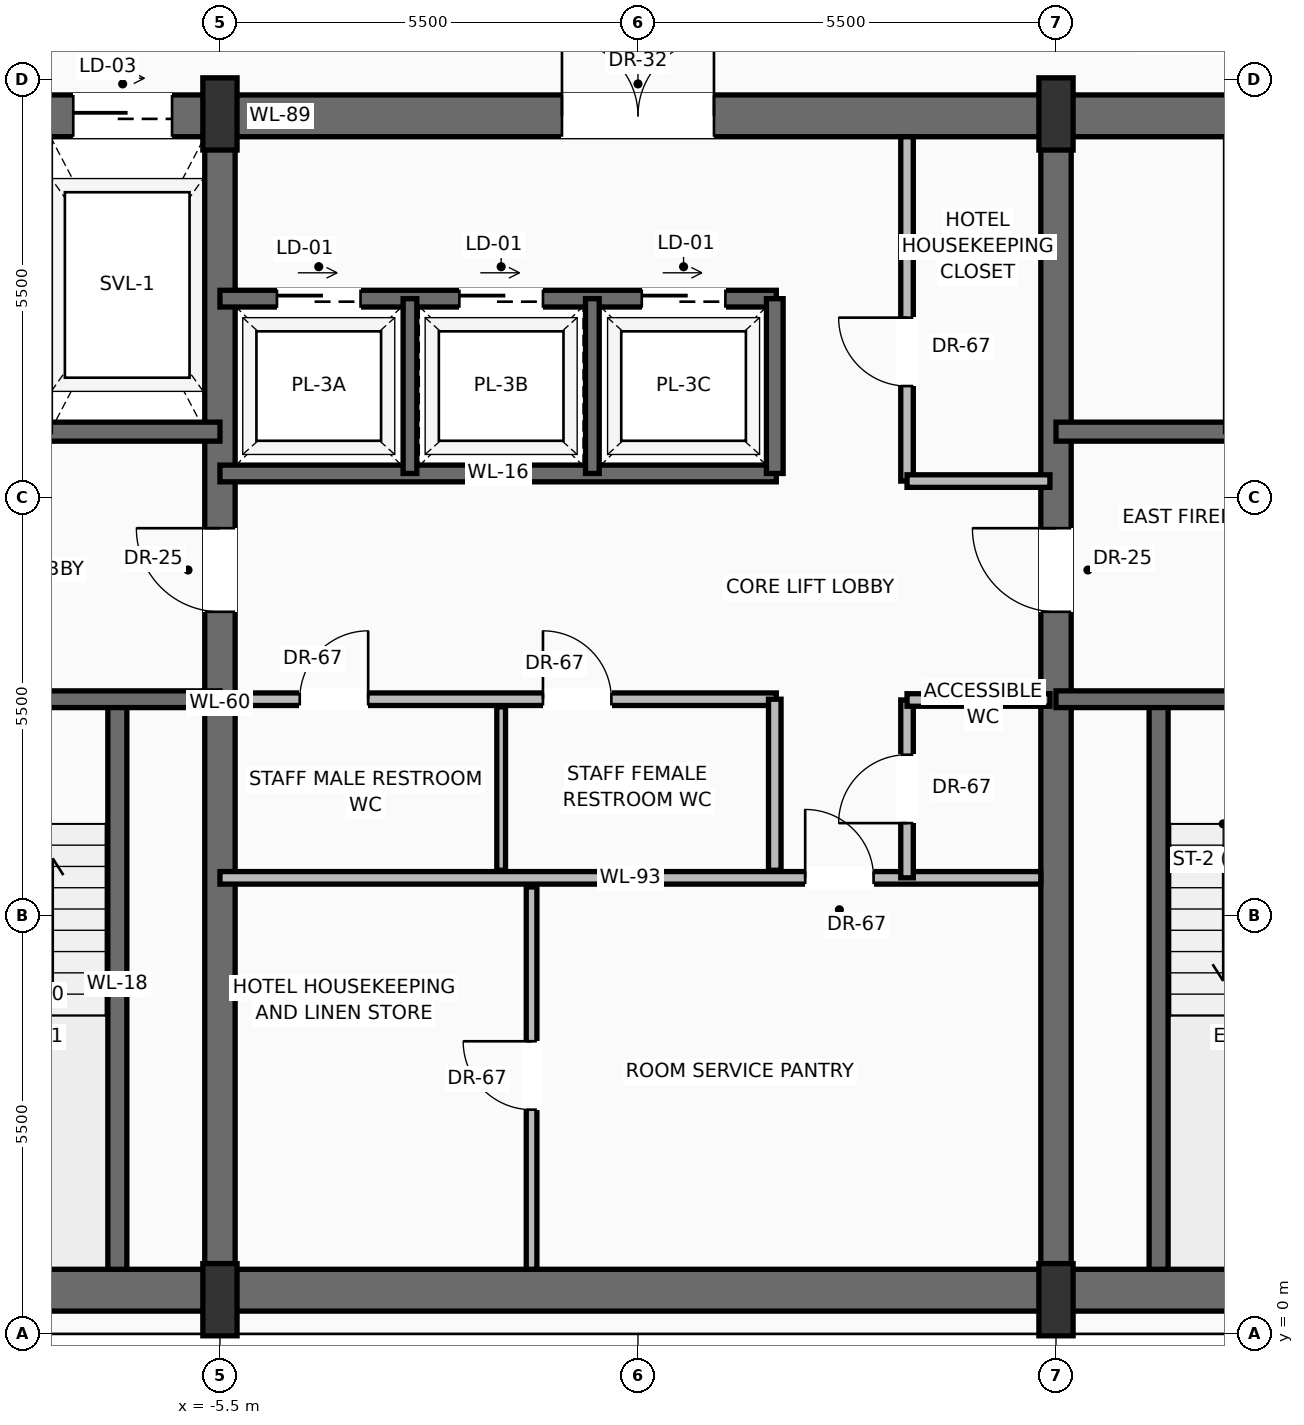
"""IFC4 building model, lengths in metres.
Left out: names, types, materials, properties, quantities, classifications, styles, units other than length and angle.
Written with IfcOpenShell. Run it as: python <this file> out.ifc"""

import sys

from ifc_helpers import new_model, si_unit, direction, frame, frame_2d, origin, origin_2d, place, context, subcontext, project, spatial, rectangle, extrude, source, transform, mapped, element, fill, save


model = new_model("IFC4")
c1 = context("Model", 3, precision=1e-05, world=origin(), true_north=direction((0.0, 1.0)))
c2 = subcontext(c1, "Body", "Model", "MODEL_VIEW")
j1 = project(units=[si_unit("LENGTHUNIT", "METRE"), si_unit("PLANEANGLEUNIT", "RADIAN")], contexts=[c1])
p1 = place(None, origin())
s1 = spatial("IfcSite", under=j1, at=p1, CompositionType="ELEMENT")
p2 = place(p1, origin())
s2 = spatial("IfcBuilding", under=s1, at=p2, CompositionType="ELEMENT")
p3 = place(p2, frame((0.0, 0.0, 254.5)))
s3 = spatial("IfcBuildingStorey", under=s2, at=p3, CompositionType="ELEMENT", Elevation=254.5)
p4 = place(p3, frame((-10.65, 0.575, 0.0), z_axis=(0.0, 0.0, 1.0), x_axis=(1.0, 0.0, 0.0)))
e1 = element("IfcWall", 1, at=p4, inside=s3, PredefinedType="SHEAR", context=c2, shape_type="SweptSolid", body=[
    extrude(rectangle(XDim=21.3, YDim=0.55, at=frame_2d((10.65, 0.0))), origin(), (0.0, 0.0, 1.0), 3.15),
])
p5 = place(p3, frame((-10.7, 16.025, 0.0), z_axis=(0.0, 0.0, 1.0), x_axis=(1.0, 0.0, 0.0)))
e2 = element("IfcWall", 2, at=p5, inside=s3, PredefinedType="SHEAR", context=c2, shape_type="SweptSolid", body=[
    extrude(rectangle(XDim=21.4, YDim=0.55, at=frame_2d((10.7, 0.0))), origin(), (0.0, 0.0, 1.0), 3.15),
])
p6 = place(p5, frame((3.27, 0.0, 0.0)))
e3 = element("IfcOpeningElement", 3, at=p6, cuts=e2, PredefinedType="OPENING", context=c2, shape_type="SweptSolid", body=[
    extrude(rectangle(XDim=1.3, YDim=2.3, at=frame_2d((0.65, 1.15))), frame((0.0, 0.285, 0.0), z_axis=(0.0, -1.0, 0.0), x_axis=(1.0, 0.0, 0.0)), (0.0, 0.0, 1.0), 0.57),
])
p7 = place(p5, frame((9.7, 0.0, 0.0)))
e4 = element("IfcOpeningElement", 4, at=p7, cuts=e2, PredefinedType="OPENING", context=c2, shape_type="SweptSolid", body=[
    extrude(rectangle(XDim=2.0, YDim=2.4, at=frame_2d((1.0, 1.2))), frame((0.0, 0.285, 0.0), z_axis=(0.0, -1.0, 0.0), x_axis=(1.0, 0.0, 0.0)), (0.0, 0.0, 1.0), 0.57),
])
p8 = place(p3, frame((-5.5, 0.575, 0.0), z_axis=(0.0, 0.0, 1.0), x_axis=(0.0, 1.0, 0.0)))
e5 = element("IfcWall", 5, at=p8, inside=s3, PredefinedType="SHEAR", context=c2, shape_type="SweptSolid", body=[
    extrude(rectangle(XDim=15.45, YDim=0.4, at=frame_2d((7.725, 0.0))), origin(), (0.0, 0.0, 1.0), 3.15),
])
p9 = place(p8, frame((8.925, 0.0, 0.0)))
e6 = element("IfcOpeningElement", 6, at=p9, cuts=e5, PredefinedType="OPENING", context=c2, shape_type="SweptSolid", body=[
    extrude(rectangle(XDim=1.1, YDim=2.2, at=frame_2d((0.55, 1.1))), frame((0.0, 0.21, 0.0), z_axis=(0.0, -1.0, 0.0), x_axis=(1.0, 0.0, 0.0)), (0.0, 0.0, 1.0), 0.42),
])
p10 = place(p3, frame((5.5, 0.575, 0.0), z_axis=(0.0, 0.0, 1.0), x_axis=(0.0, 1.0, 0.0)))
e7 = element("IfcWall", 7, at=p10, inside=s3, PredefinedType="SHEAR", context=c2, shape_type="SweptSolid", body=[
    extrude(rectangle(XDim=15.45, YDim=0.4, at=frame_2d((7.725, 0.0))), origin(), (0.0, 0.0, 1.0), 3.15),
])
p11 = place(p10, frame((8.925, 0.0, 0.0)))
e8 = element("IfcOpeningElement", 8, at=p11, cuts=e7, PredefinedType="OPENING", context=c2, shape_type="SweptSolid", body=[
    extrude(rectangle(XDim=1.1, YDim=2.2, at=frame_2d((0.55, 1.1))), frame((0.0, 0.21, 0.0), z_axis=(0.0, -1.0, 0.0), x_axis=(1.0, 0.0, 0.0)), (0.0, 0.0, 1.0), 0.42),
])
m1 = source(origin(), c2, "Body", "SweptSolid", [
    extrude(rectangle(XDim=0.45, YDim=0.95, at=origin_2d()), origin(), (0.0, 0.0, 1.0), 3.45),
])
for number, where, z_axis, x_axis in (
    (9, (-5.5, 0.45, 0.0), (0.0, 0.0, 1.0), (1.0, 0.0, 0.0)),
    (10, (5.5, 0.45, 0.0), (0.0, 0.0, 1.0), (1.0, 0.0, 0.0)),
    (11, (-5.5, 16.05, 0.0), (0.0, 0.0, 1.0), (1.0, 0.0, 0.0)),
    (12, (5.5, 16.05, 0.0), (0.0, 0.0, 1.0), (1.0, 0.0, 0.0)),
):
    element("IfcColumn", number, at=place(p3, frame(where, z_axis=z_axis, x_axis=x_axis)), inside=s3, PredefinedType="PILASTER", context=c2, shape_type="MappedRepresentation", body=[
        mapped(m1, transform((0.0, 0.0, 0.0), scale=1.0)),
    ])
p12 = place(p3, frame((-6.85, 0.85, 0.0), z_axis=(0.0, 0.0, 1.0), x_axis=(0.0, 1.0, 0.0)))
e13 = element("IfcWall", 13, at=p12, inside=s3, PredefinedType="SOLIDWALL", context=c2, shape_type="SweptSolid", body=[
    extrude(rectangle(XDim=7.5, YDim=0.25, at=frame_2d((3.75, 0.0))), origin(), (0.0, 0.0, 1.0), 3.15),
])
p13 = place(p3, frame((-5.5, 8.35, 0.0), z_axis=(0.0, 0.0, 1.0), x_axis=(-1.0, 0.0, 0.0)))
e14 = element("IfcWall", 14, at=p13, inside=s3, PredefinedType="SOLIDWALL", context=c2, shape_type="SweptSolid", body=[
    extrude(rectangle(XDim=4.65, YDim=0.22, at=frame_2d((2.325, 0.0))), origin(), (0.0, 0.0, 1.0), 3.15),
])
p14 = place(p13, frame((2.5, 0.0, 0.0)))
e15 = element("IfcOpeningElement", 15, at=p14, cuts=e14, PredefinedType="OPENING", context=c2, shape_type="SweptSolid", body=[
    extrude(rectangle(XDim=1.15, YDim=2.2, at=frame_2d((0.575, 1.1))), frame((0.0, 0.12, 0.0), z_axis=(0.0, -1.0, 0.0), x_axis=(1.0, 0.0, 0.0)), (0.0, 0.0, 1.0), 0.24),
])
p15 = place(p3, frame((-5.5, 11.87, 0.0), z_axis=(0.0, 0.0, 1.0), x_axis=(-1.0, 0.0, 0.0)))
e16 = element("IfcWall", 16, at=p15, inside=s3, PredefinedType="SOLIDWALL", context=c2, shape_type="SweptSolid", body=[
    extrude(rectangle(XDim=4.65, YDim=0.25, at=frame_2d((2.325, 0.0))), origin(), (0.0, 0.0, 1.0), 3.15),
])
p16 = place(p15, frame((2.95, 0.0, 0.0)))
e17 = element("IfcOpeningElement", 17, at=p16, cuts=e16, PredefinedType="OPENING", context=c2, shape_type="SweptSolid", body=[
    extrude(rectangle(XDim=1.2, YDim=2.25, at=frame_2d((0.6, 1.125))), frame((0.0, 0.135, 0.0), z_axis=(0.0, -1.0, 0.0), x_axis=(1.0, 0.0, 0.0)), (0.0, 0.0, 1.0), 0.27),
])
p17 = place(p3, frame((6.85, 0.85, 0.0), z_axis=(0.0, 0.0, 1.0), x_axis=(0.0, 1.0, 0.0)))
e18 = element("IfcWall", 18, at=p17, inside=s3, PredefinedType="SOLIDWALL", context=c2, shape_type="SweptSolid", body=[
    extrude(rectangle(XDim=7.5, YDim=0.25, at=frame_2d((3.75, 0.0))), origin(), (0.0, 0.0, 1.0), 3.15),
])
p18 = place(p3, frame((10.15, 8.35, 0.0), z_axis=(0.0, 0.0, 1.0), x_axis=(-1.0, 0.0, 0.0)))
e19 = element("IfcWall", 19, at=p18, inside=s3, PredefinedType="SOLIDWALL", context=c2, shape_type="SweptSolid", body=[
    extrude(rectangle(XDim=4.65, YDim=0.22, at=frame_2d((2.325, 0.0))), origin(), (0.0, 0.0, 1.0), 3.15),
])
p19 = place(p18, frame((1.0, 0.0, 0.0)))
e20 = element("IfcOpeningElement", 20, at=p19, cuts=e19, PredefinedType="OPENING", context=c2, shape_type="SweptSolid", body=[
    extrude(rectangle(XDim=1.15, YDim=2.2, at=frame_2d((0.575, 1.1))), frame((0.0, 0.12, 0.0), z_axis=(0.0, -1.0, 0.0), x_axis=(1.0, 0.0, 0.0)), (0.0, 0.0, 1.0), 0.24),
])
p20 = place(p3, frame((10.15, 11.87, 0.0), z_axis=(0.0, 0.0, 1.0), x_axis=(-1.0, 0.0, 0.0)))
e21 = element("IfcWall", 21, at=p20, inside=s3, PredefinedType="SOLIDWALL", context=c2, shape_type="SweptSolid", body=[
    extrude(rectangle(XDim=4.65, YDim=0.25, at=frame_2d((2.325, 0.0))), origin(), (0.0, 0.0, 1.0), 3.15),
])
p21 = place(p20, frame((0.5, 0.0, 0.0)))
e22 = element("IfcOpeningElement", 22, at=p21, cuts=e21, PredefinedType="OPENING", context=c2, shape_type="SweptSolid", body=[
    extrude(rectangle(XDim=1.2, YDim=2.25, at=frame_2d((0.6, 1.125))), frame((0.0, 0.135, 0.0), z_axis=(0.0, -1.0, 0.0), x_axis=(1.0, 0.0, 0.0)), (0.0, 0.0, 1.0), 0.27),
])
p22 = place(p3, frame((-5.5, 6.0, 0.0), z_axis=(0.0, 0.0, 1.0), x_axis=(1.0, 0.0, 0.0)))
e23 = element("IfcWall", 23, at=p22, inside=s3, PredefinedType="PARTITIONING", context=c2, shape_type="SweptSolid", body=[
    extrude(rectangle(XDim=10.8, YDim=0.165, at=frame_2d((5.4, 0.0))), origin(), (0.0, 0.0, 1.0), 3.142),
])
p23 = place(p22, frame((7.7, 0.0, 0.0)))
e24 = element("IfcOpeningElement", 24, at=p23, cuts=e23, PredefinedType="OPENING", context=c2, shape_type="SweptSolid", body=[
    extrude(rectangle(XDim=0.9, YDim=2.1, at=frame_2d((0.45, 1.05))), frame((0.0, 0.093, 0.0), z_axis=(0.0, -1.0, 0.0), x_axis=(1.0, 0.0, 0.0)), (0.0, 0.0, 1.0), 0.185),
])
p24 = place(p3, frame((-1.4, 0.85, 0.0), z_axis=(0.0, 0.0, 1.0), x_axis=(0.0, 1.0, 0.0)))
e25 = element("IfcWall", 25, at=p24, inside=s3, PredefinedType="PARTITIONING", context=c2, shape_type="SweptSolid", body=[
    extrude(rectangle(XDim=5.03, YDim=0.14, at=frame_2d((2.515, 0.0))), origin(), (0.0, 0.0, 1.0), 3.142),
])
p25 = place(p24, frame((2.1, 0.0, 0.0)))
e26 = element("IfcOpeningElement", 26, at=p25, cuts=e25, PredefinedType="OPENING", context=c2, shape_type="SweptSolid", body=[
    extrude(rectangle(XDim=0.9, YDim=2.1, at=frame_2d((0.45, 1.05))), frame((0.0, 0.08, 0.0), z_axis=(0.0, -1.0, 0.0), x_axis=(1.0, 0.0, 0.0)), (0.0, 0.0, 1.0), 0.16),
])
p26 = place(p3, frame((3.54, 6.0, 0.0), z_axis=(0.0, 0.0, 1.0), x_axis=(0.0, 1.0, 0.0)))
e27 = element("IfcWall", 27, at=p26, inside=s3, PredefinedType="PARTITIONING", context=c2, shape_type="SweptSolid", body=[
    extrude(rectangle(XDim=2.34, YDim=0.165, at=frame_2d((1.17, 0.0))), origin(), (0.0, 0.0, 1.0), 3.142),
])
p27 = place(p26, frame((0.72, 0.0, 0.0)))
e28 = element("IfcOpeningElement", 28, at=p27, cuts=e27, PredefinedType="OPENING", context=c2, shape_type="SweptSolid", body=[
    extrude(rectangle(XDim=0.9, YDim=2.1, at=frame_2d((0.45, 1.05))), frame((0.0, 0.093, 0.0), z_axis=(0.0, -1.0, 0.0), x_axis=(1.0, 0.0, 0.0)), (0.0, 0.0, 1.0), 0.185),
])
p28 = place(p3, frame((3.54, 8.34, 0.0), z_axis=(0.0, 0.0, 1.0), x_axis=(1.0, 0.0, 0.0)))
e29 = element("IfcWall", 29, at=p28, inside=s3, PredefinedType="PARTITIONING", context=c2, shape_type="SweptSolid", body=[
    extrude(rectangle(XDim=1.88, YDim=0.165, at=frame_2d((0.94, 0.0))), origin(), (0.0, 0.0, 1.0), 3.142),
])
p29 = place(p3, frame((-5.3, 8.35, 0.0), z_axis=(0.0, 0.0, 1.0), x_axis=(1.0, 0.0, 0.0)))
e30 = element("IfcWall", 30, at=p29, inside=s3, PredefinedType="PARTITIONING", context=c2, shape_type="SweptSolid", body=[
    extrude(rectangle(XDim=7.12, YDim=0.165, at=frame_2d((3.56, 0.0))), origin(), (0.0, 0.0, 1.0), 3.142),
])
p30 = place(p29, frame((0.85, 0.0, 0.0)))
e31 = element("IfcOpeningElement", 31, at=p30, cuts=e30, PredefinedType="OPENING", context=c2, shape_type="SweptSolid", body=[
    extrude(rectangle(XDim=0.9, YDim=2.1, at=frame_2d((0.45, 1.05))), frame((0.0, 0.093, 0.0), z_axis=(0.0, -1.0, 0.0), x_axis=(1.0, 0.0, 0.0)), (0.0, 0.0, 1.0), 0.185),
])
p31 = place(p29, frame((4.05, 0.0, 0.0)))
e32 = element("IfcOpeningElement", 32, at=p31, cuts=e30, PredefinedType="OPENING", context=c2, shape_type="SweptSolid", body=[
    extrude(rectangle(XDim=0.9, YDim=2.1, at=frame_2d((0.45, 1.05))), frame((0.0, 0.093, 0.0), z_axis=(0.0, -1.0, 0.0), x_axis=(1.0, 0.0, 0.0)), (0.0, 0.0, 1.0), 0.185),
])
p32 = place(p3, frame((1.8, 6.1, 0.0), z_axis=(0.0, 0.0, 1.0), x_axis=(0.0, 1.0, 0.0)))
e33 = element("IfcWall", 33, at=p32, inside=s3, PredefinedType="PARTITIONING", context=c2, shape_type="SweptSolid", body=[
    extrude(rectangle(XDim=2.25, YDim=0.165, at=frame_2d((1.125, 0.0))), origin(), (0.0, 0.0, 1.0), 3.142),
])
p33 = place(p3, frame((-1.8, 6.1, 0.0), z_axis=(0.0, 0.0, 1.0), x_axis=(0.0, 1.0, 0.0)))
e34 = element("IfcWall", 34, at=p33, inside=s3, PredefinedType="PARTITIONING", context=c2, shape_type="SweptSolid", body=[
    extrude(rectangle(XDim=2.15, YDim=0.115, at=frame_2d((1.075, 0.0))), origin(), (0.0, 0.0, 1.0), 3.142),
])
p34 = place(p3, frame((-5.5, 11.32, 0.0), z_axis=(0.0, 0.0, 1.0), x_axis=(1.0, 0.0, 0.0)))
e35 = element("IfcWall", 35, at=p34, inside=s3, PredefinedType="SOLIDWALL", context=c2, shape_type="SweptSolid", body=[
    extrude(rectangle(XDim=7.32, YDim=0.22, at=frame_2d((3.66, 0.0))), origin(), (0.0, 0.0, 1.0), 3.15),
])
p35 = place(p3, frame((-5.5, 13.62, 0.0), z_axis=(0.0, 0.0, 1.0), x_axis=(1.0, 0.0, 0.0)))
e36 = element("IfcWall", 36, at=p35, inside=s3, PredefinedType="SOLIDWALL", context=c2, shape_type="SweptSolid", body=[
    extrude(rectangle(XDim=7.32, YDim=0.22, at=frame_2d((3.66, 0.0))), origin(), (0.0, 0.0, 1.0), 3.15),
])
p36 = place(p35, frame((0.75, 0.0, 0.0)))
e37 = element("IfcOpeningElement", 37, at=p36, cuts=e36, PredefinedType="OPENING", context=c2, shape_type="SweptSolid", body=[
    extrude(rectangle(XDim=1.1, YDim=2.2, at=frame_2d((0.55, 1.1))), frame((0.0, 0.12, 0.0), z_axis=(0.0, -1.0, 0.0), x_axis=(1.0, 0.0, 0.0)), (0.0, 0.0, 1.0), 0.24),
])
p37 = place(p35, frame((3.15, 0.0, 0.0)))
e38 = element("IfcOpeningElement", 38, at=p37, cuts=e36, PredefinedType="OPENING", context=c2, shape_type="SweptSolid", body=[
    extrude(rectangle(XDim=1.1, YDim=2.2, at=frame_2d((0.55, 1.1))), frame((0.0, 0.12, 0.0), z_axis=(0.0, -1.0, 0.0), x_axis=(1.0, 0.0, 0.0)), (0.0, 0.0, 1.0), 0.24),
])
p38 = place(p35, frame((5.55, 0.0, 0.0)))
e39 = element("IfcOpeningElement", 39, at=p38, cuts=e36, PredefinedType="OPENING", context=c2, shape_type="SweptSolid", body=[
    extrude(rectangle(XDim=1.1, YDim=2.2, at=frame_2d((0.55, 1.1))), frame((0.0, 0.12, 0.0), z_axis=(0.0, -1.0, 0.0), x_axis=(1.0, 0.0, 0.0)), (0.0, 0.0, 1.0), 0.24),
])
p39 = place(p3, frame((1.8, 11.32, 0.0), z_axis=(0.0, 0.0, 1.0), x_axis=(0.0, 1.0, 0.0)))
e40 = element("IfcWall", 40, at=p39, inside=s3, PredefinedType="SOLIDWALL", context=c2, shape_type="SweptSolid", body=[
    extrude(rectangle(XDim=2.3, YDim=0.22, at=frame_2d((1.15, 0.0))), origin(), (0.0, 0.0, 1.0), 3.15),
])
for number, where, z_axis, x_axis in (
    (41, (-3.0, 11.32, 0.0), (0.0, 0.0, 1.0), (0.0, 1.0, 0.0)),
    (42, (-0.6, 11.32, 0.0), (0.0, 0.0, 1.0), (0.0, 1.0, 0.0)),
):
    element("IfcWall", number, at=place(p3, frame(where, z_axis=z_axis, x_axis=x_axis)), inside=s3, PredefinedType="SOLIDWALL", context=c2, shape_type="SweptSolid", body=[
        extrude(rectangle(XDim=2.3, YDim=0.18, at=frame_2d((1.15, 0.0))), origin(), (0.0, 0.0, 1.0), 3.15),
    ])
p40 = place(p3, frame((3.54, 11.22, 0.0), z_axis=(0.0, 0.0, 1.0), x_axis=(0.0, 1.0, 0.0)))
e43 = element("IfcWall", 43, at=p40, inside=s3, PredefinedType="PARTITIONING", context=c2, shape_type="SweptSolid", body=[
    extrude(rectangle(XDim=4.53, YDim=0.165, at=frame_2d((2.265, 0.0))), origin(), (0.0, 0.0, 1.0), 3.142),
])
p41 = place(p40, frame((1.25, 0.0, 0.0)))
e44 = element("IfcOpeningElement", 44, at=p41, cuts=e43, PredefinedType="OPENING", context=c2, shape_type="SweptSolid", body=[
    extrude(rectangle(XDim=0.9, YDim=2.1, at=frame_2d((0.45, 1.05))), frame((0.0, 0.093, 0.0), z_axis=(0.0, -1.0, 0.0), x_axis=(1.0, 0.0, 0.0)), (0.0, 0.0, 1.0), 0.185),
])
p42 = place(p3, frame((3.54, 11.22, 0.0), z_axis=(0.0, 0.0, 1.0), x_axis=(1.0, 0.0, 0.0)))
e45 = element("IfcWall", 45, at=p42, inside=s3, PredefinedType="PARTITIONING", context=c2, shape_type="SweptSolid", body=[
    extrude(rectangle(XDim=1.88, YDim=0.165, at=frame_2d((0.94, 0.0))), origin(), (0.0, 0.0, 1.0), 3.142),
])
m2 = source(origin(), c2, "Body", "SweptSolid", [
    extrude(rectangle(XDim=1.1, YDim=2.2, at=frame_2d((0.55, 1.1))), frame((0.0, 0.025, 0.0), z_axis=(0.0, -1.0, 0.0), x_axis=(1.0, 0.0, 0.0)), (0.0, 0.0, 1.0), 0.05),
])
p43 = place(p9, origin())
e46 = element("IfcDoor", 46, at=p43, inside=s3, OperationType="SINGLE_SWING_RIGHT", PredefinedType="DOOR", context=c2, shape_type="MappedRepresentation", body=[
    mapped(m2, transform((0.0, 0.0, 0.0), scale=1.0)),
])
fill(e6, e46)
m3 = source(origin(), c2, "Body", "SweptSolid", [
    extrude(rectangle(XDim=1.3, YDim=2.3, at=frame_2d((0.65, 1.15))), frame((0.0, 0.025, 0.0), z_axis=(0.0, -1.0, 0.0), x_axis=(1.0, 0.0, 0.0)), (0.0, 0.0, 1.0), 0.05),
])
p44 = place(p6, origin())
e47 = element("IfcDoor", 47, at=p44, inside=s3, OperationType="SLIDING_TO_RIGHT", PredefinedType="DOOR", context=c2, shape_type="MappedRepresentation", body=[
    mapped(m3, transform((0.0, 0.0, 0.0), scale=1.0)),
])
fill(e3, e47)
p45 = place(p11, origin())
e48 = element("IfcDoor", 48, at=p45, inside=s3, OperationType="SINGLE_SWING_RIGHT", PredefinedType="DOOR", context=c2, shape_type="MappedRepresentation", body=[
    mapped(m2, transform((0.0, 0.0, 0.0), scale=1.0)),
])
fill(e8, e48)
m4 = source(origin(), c2, "Body", "SweptSolid", [
    extrude(rectangle(XDim=2.0, YDim=2.4, at=frame_2d((1.0, 1.2))), frame((0.0, 0.025, 0.0), z_axis=(0.0, -1.0, 0.0), x_axis=(1.0, 0.0, 0.0)), (0.0, 0.0, 1.0), 0.05),
])
p46 = place(p7, origin())
e49 = element("IfcDoor", 49, at=p46, inside=s3, OperationType="DOUBLE_DOOR_SINGLE_SWING", PredefinedType="DOOR", context=c2, shape_type="MappedRepresentation", body=[
    mapped(m4, transform((0.0, 0.0, 0.0), scale=1.0)),
])
fill(e4, e49)
m5 = source(origin(), c2, "Body", "SweptSolid", [
    extrude(rectangle(XDim=0.9, YDim=2.1, at=frame_2d((0.45, 1.05))), frame((0.0, 0.025, 0.0), z_axis=(0.0, -1.0, 0.0), x_axis=(1.0, 0.0, 0.0)), (0.0, 0.0, 1.0), 0.05),
])
p47 = place(p23, origin())
e50 = element("IfcDoor", 50, at=p47, inside=s3, OperationType="SINGLE_SWING_LEFT", PredefinedType="DOOR", context=c2, shape_type="MappedRepresentation", body=[
    mapped(m5, transform((0.0, 0.0, 0.0), scale=1.0)),
])
fill(e24, e50)
p48 = place(p25, origin())
e51 = element("IfcDoor", 51, at=p48, inside=s3, OperationType="SINGLE_SWING_RIGHT", PredefinedType="DOOR", context=c2, shape_type="MappedRepresentation", body=[
    mapped(m5, transform((0.0, 0.0, 0.0), scale=1.0)),
])
fill(e26, e51)
p49 = place(p27, origin())
e52 = element("IfcDoor", 52, at=p49, inside=s3, OperationType="SINGLE_SWING_LEFT", PredefinedType="DOOR", context=c2, shape_type="MappedRepresentation", body=[
    mapped(m5, transform((0.0, 0.0, 0.0), scale=1.0)),
])
fill(e28, e52)
p50 = place(p30, origin())
e53 = element("IfcDoor", 53, at=p50, inside=s3, OperationType="SINGLE_SWING_RIGHT", PredefinedType="DOOR", context=c2, shape_type="MappedRepresentation", body=[
    mapped(m5, transform((0.0, 0.0, 0.0), scale=1.0)),
])
fill(e31, e53)
p51 = place(p31, origin())
e54 = element("IfcDoor", 54, at=p51, inside=s3, OperationType="SINGLE_SWING_LEFT", PredefinedType="DOOR", context=c2, shape_type="MappedRepresentation", body=[
    mapped(m5, transform((0.0, 0.0, 0.0), scale=1.0)),
])
fill(e32, e54)
m6 = source(origin(), c2, "Body", "SweptSolid", [
    extrude(rectangle(XDim=1.1, YDim=2.2, at=frame_2d((0.55, 1.1))), frame((0.0, 0.025, 0.0), z_axis=(0.0, -1.0, 0.0), x_axis=(1.0, 0.0, 0.0)), (0.0, 0.0, 1.0), 0.05),
])
p52 = place(p36, origin())
e55 = element("IfcDoor", 55, at=p52, inside=s3, OperationType="SLIDING_TO_RIGHT", PredefinedType="DOOR", context=c2, shape_type="MappedRepresentation", body=[
    mapped(m6, transform((0.0, 0.0, 0.0), scale=1.0)),
])
fill(e37, e55)
p53 = place(p37, origin())
e56 = element("IfcDoor", 56, at=p53, inside=s3, OperationType="SLIDING_TO_RIGHT", PredefinedType="DOOR", context=c2, shape_type="MappedRepresentation", body=[
    mapped(m6, transform((0.0, 0.0, 0.0), scale=1.0)),
])
fill(e38, e56)
p54 = place(p38, origin())
e57 = element("IfcDoor", 57, at=p54, inside=s3, OperationType="SLIDING_TO_RIGHT", PredefinedType="DOOR", context=c2, shape_type="MappedRepresentation", body=[
    mapped(m6, transform((0.0, 0.0, 0.0), scale=1.0)),
])
fill(e39, e57)
p55 = place(p41, origin())
e58 = element("IfcDoor", 58, at=p55, inside=s3, OperationType="SINGLE_SWING_RIGHT", PredefinedType="DOOR", context=c2, shape_type="MappedRepresentation", body=[
    mapped(m5, transform((0.0, 0.0, 0.0), scale=1.0)),
])
fill(e44, e58)
save(model, sys.argv[1])
